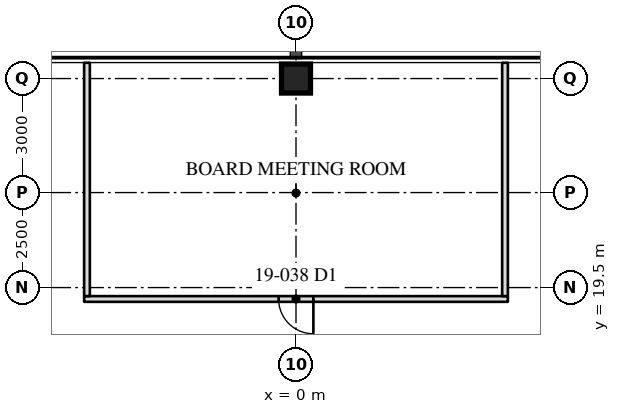
"""IFC4 building model, lengths in metres.
Left out: names, types, materials, properties, quantities, classifications, styles, units other than length and angle.
Written with IfcOpenShell. Run it as: python <this file> out.ifc"""

import sys

from ifc_helpers import new_model, si_unit, direction, frame, frame_2d, origin, origin_2d, place, context, subcontext, project, spatial, rectangle, hollow_rectangle, extrude, element, fill, save


model = new_model("IFC4")
c1 = context("Model", 3, precision=1e-05, world=origin(), true_north=direction((0.0, 1.0)))
c2 = subcontext(c1, "Body", "Model", "MODEL_VIEW")
j1 = project(units=[si_unit("LENGTHUNIT", "METRE"), si_unit("PLANEANGLEUNIT", "RADIAN")], contexts=[c1])
p1 = place(None, origin())
s1 = spatial("IfcSite", under=j1, at=p1, CompositionType="ELEMENT")
p2 = place(p1, origin())
s2 = spatial("IfcBuilding", under=s1, at=p2, CompositionType="ELEMENT")
p3 = place(p2, frame((0.0, 0.0, 81.6)))
s3 = spatial("IfcBuildingStorey", under=s2, at=p3, CompositionType="ELEMENT", Elevation=81.6)
p4 = place(p3, frame((0.0, 25.0, 0.0), z_axis=(0.0, 0.0, 1.0), x_axis=(1.0, 0.0, 0.0)))
e1 = element("IfcColumn", 1, at=p4, inside=s3, PredefinedType="COLUMN", context=c2, shape_type="SweptSolid", body=[
    extrude(hollow_rectangle(XDim=0.762, YDim=0.762, WallThickness=0.127, at=origin_2d()), origin(), (0.0, 0.0, 1.0), 4.1),
])
p5 = place(p3, frame((5.575, 19.2, 0.0), z_axis=(0.0, 0.0, 1.0), x_axis=(-1.0, 0.0, 0.0)))
e2 = element("IfcWall", 2, at=p5, inside=s3, PredefinedType="PARTITIONING", context=c2, shape_type="SweptSolid", body=[
    extrude(rectangle(XDim=11.15, YDim=0.15, at=frame_2d((5.575, 0.0))), origin(), (0.0, 0.0, 1.0), 3.91),
])
p6 = place(p5, frame((5.117, 0.0, 0.0)))
e3 = element("IfcOpeningElement", 3, at=p6, cuts=e2, PredefinedType="OPENING", context=c2, shape_type="SweptSolid", body=[
    extrude(rectangle(XDim=0.915, YDim=2.134, at=frame_2d((0.458, 1.067))), frame((0.0, 0.085, 0.0), z_axis=(0.0, -1.0, 0.0), x_axis=(1.0, 0.0, 0.0)), (0.0, 0.0, 1.0), 0.17),
])
for number, where, z_axis, x_axis in (
    (4, (5.5, 19.275, 0.0), (0.0, 0.0, 1.0), (0.0, 1.0, 0.0)),
    (5, (-5.5, 19.275, 0.0), (0.0, 0.0, 1.0), (0.0, 1.0, 0.0)),
):
    element("IfcWall", number, at=place(p3, frame(where, z_axis=z_axis, x_axis=x_axis)), inside=s3, PredefinedType="PARTITIONING", context=c2, shape_type="SweptSolid", body=[
        extrude(rectangle(XDim=6.14, YDim=0.15, at=frame_2d((3.07, 0.0))), origin(), (0.0, 0.0, 1.0), 3.91),
    ])
p7 = place(p6, origin())
e6 = element("IfcDoor", 6, at=p7, inside=s3, OperationType="SINGLE_SWING_LEFT", PredefinedType="DOOR", context=c2, shape_type="SweptSolid", body=[
    extrude(rectangle(XDim=0.915, YDim=2.134, at=frame_2d((0.458, 1.067))), frame((0.0, 0.025, 0.0), z_axis=(0.0, -1.0, 0.0), x_axis=(1.0, 0.0, 0.0)), (0.0, 0.0, 1.0), 0.05),
])
fill(e3, e6)
save(model, sys.argv[1])
